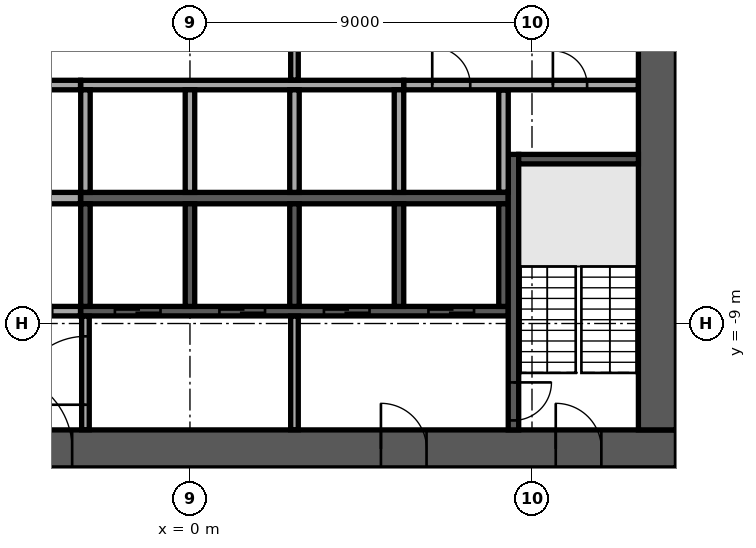
"""IFC4 building model, lengths in metres.
Left out: names, types, materials, properties, quantities, classifications, styles, units other than length and angle.
Written with IfcOpenShell. Run it as: python <this file> out.ifc"""

import sys

from ifc_helpers import new_model, si_unit, direction, frame, frame_2d, origin, place, context, subcontext, project, spatial, rectangle, extrude, element, fill, save


model = new_model("IFC4")
c1 = context("Model", 3, precision=1e-05, world=origin(), true_north=direction((0.0, 1.0)))
c2 = subcontext(c1, "Body", "Model", "MODEL_VIEW")
j1 = project(units=[si_unit("LENGTHUNIT", "METRE"), si_unit("PLANEANGLEUNIT", "RADIAN")], contexts=[c1])
p1 = place(None, origin())
s1 = spatial("IfcSite", under=j1, at=p1, CompositionType="ELEMENT")
p2 = place(p1, origin())
s2 = spatial("IfcBuilding", under=s1, at=p2, CompositionType="ELEMENT")
p3 = place(p2, frame((0.0, 0.0, 139.7)))
s3 = spatial("IfcBuildingStorey", under=s2, at=p3, CompositionType="ELEMENT", Elevation=139.7)
p4 = place(p3, frame((-12.8, -12.3, 0.0), z_axis=(0.0, 0.0, 1.0), x_axis=(1.0, 0.0, 0.0)))
e1 = element("IfcWall", 1, at=p4, inside=s3, PredefinedType="SHEAR", context=c2, shape_type="SweptSolid", body=[
    extrude(rectangle(XDim=25.6, YDim=1.0, at=frame_2d((12.8, 0.0))), origin(), (0.0, 0.0, 1.0), 3.6),
])
p5 = place(p4, frame((7.7, 0.0, 0.0)))
e2 = element("IfcOpeningElement", 2, at=p5, cuts=e1, PredefinedType="OPENING", context=c2, shape_type="SweptSolid", body=[
    extrude(rectangle(XDim=2.0, YDim=2.1, at=frame_2d((1.0, 1.05))), frame((0.0, 0.51, 0.0), z_axis=(0.0, -1.0, 0.0), x_axis=(1.0, 0.0, 0.0)), (0.0, 0.0, 1.0), 1.02),
])
p6 = place(p4, frame((17.825, 0.0, 0.0)))
e3 = element("IfcOpeningElement", 3, at=p6, cuts=e1, PredefinedType="OPENING", context=c2, shape_type="SweptSolid", body=[
    extrude(rectangle(XDim=1.2, YDim=2.1, at=frame_2d((0.6, 1.05))), frame((0.0, 0.51, 0.0), z_axis=(0.0, -1.0, 0.0), x_axis=(1.0, 0.0, 0.0)), (0.0, 0.0, 1.0), 1.02),
])
p7 = place(p4, frame((1.975, 0.0, 0.0)))
e4 = element("IfcOpeningElement", 4, at=p7, cuts=e1, PredefinedType="OPENING", context=c2, shape_type="SweptSolid", body=[
    extrude(rectangle(XDim=1.2, YDim=2.1, at=frame_2d((0.6, 1.05))), frame((0.0, 0.51, 0.0), z_axis=(0.0, -1.0, 0.0), x_axis=(1.0, 0.0, 0.0)), (0.0, 0.0, 1.0), 1.02),
])
p8 = place(p4, frame((22.425, 0.0, 0.0)))
e5 = element("IfcOpeningElement", 5, at=p8, cuts=e1, PredefinedType="OPENING", context=c2, shape_type="SweptSolid", body=[
    extrude(rectangle(XDim=1.2, YDim=2.1, at=frame_2d((0.6, 1.05))), frame((0.0, 0.51, 0.0), z_axis=(0.0, -1.0, 0.0), x_axis=(1.0, 0.0, 0.0)), (0.0, 0.0, 1.0), 1.02),
])
p9 = place(p3, frame((12.3, -11.8, 0.0), z_axis=(0.0, 0.0, 1.0), x_axis=(0.0, 1.0, 0.0)))
e6 = element("IfcWall", 6, at=p9, inside=s3, PredefinedType="SHEAR", context=c2, shape_type="SweptSolid", body=[
    extrude(rectangle(XDim=23.6, YDim=1.0, at=frame_2d((11.8, 0.0))), origin(), (0.0, 0.0, 1.0), 3.6),
])
p10 = place(p9, frame((10.6, 0.0, 0.0)))
e7 = element("IfcOpeningElement", 7, at=p10, cuts=e6, PredefinedType="OPENING", context=c2, shape_type="SweptSolid", body=[
    extrude(rectangle(XDim=2.4, YDim=2.4, at=frame_2d((1.2, 1.2))), frame((0.0, 0.51, 0.0), z_axis=(0.0, -1.0, 0.0), x_axis=(1.0, 0.0, 0.0)), (0.0, 0.0, 1.0), 1.02),
])
p11 = place(p3, frame((-2.875, -5.7, 0.0), z_axis=(0.0, 0.0, 1.0), x_axis=(1.0, 0.0, 0.0)))
e8 = element("IfcWall", 8, at=p11, inside=s3, PredefinedType="SOLIDWALL", context=c2, shape_type="SweptSolid", body=[
    extrude(rectangle(XDim=11.25, YDim=0.3, at=frame_2d((5.625, 0.0))), origin(), (0.0, 0.0, 1.0), 3.6),
])
p12 = place(p3, frame((-2.875, -2.725, 0.0), z_axis=(0.0, 0.0, 1.0), x_axis=(1.0, 0.0, 0.0)))
e9 = element("IfcWall", 9, at=p12, inside=s3, PredefinedType="SOLIDWALL", context=c2, shape_type="SweptSolid", body=[
    extrude(rectangle(XDim=8.5, YDim=0.25, at=frame_2d((4.25, 0.0))), origin(), (0.0, 0.0, 1.0), 3.6),
])
for number, where, z_axis, x_axis in (
    (10, (-2.75, -5.55, 0.0), (0.0, 0.0, 1.0), (0.0, 1.0, 0.0)),
    (11, (0.0, -5.55, 0.0), (0.0, 0.0, 1.0), (0.0, 1.0, 0.0)),
    (12, (2.75, -5.55, 0.0), (0.0, 0.0, 1.0), (0.0, 1.0, 0.0)),
    (13, (5.5, -5.55, 0.0), (0.0, 0.0, 1.0), (0.0, 1.0, 0.0)),
):
    element("IfcWall", number, at=place(p3, frame(where, z_axis=z_axis, x_axis=x_axis)), inside=s3, PredefinedType="SOLIDWALL", context=c2, shape_type="SweptSolid", body=[
        extrude(rectangle(XDim=2.7, YDim=0.25, at=frame_2d((1.35, 0.0))), origin(), (0.0, 0.0, 1.0), 3.6),
    ])
p13 = place(p3, frame((-2.875, -8.675, 0.0), z_axis=(0.0, 0.0, 1.0), x_axis=(1.0, 0.0, 0.0)))
e14 = element("IfcWall", 14, at=p13, inside=s3, PredefinedType="SOLIDWALL", context=c2, shape_type="SweptSolid", body=[
    extrude(rectangle(XDim=11.25, YDim=0.25, at=frame_2d((5.625, 0.0))), origin(), (0.0, 0.0, 1.0), 3.6),
])
p14 = place(p13, frame((0.9, 0.0, 0.0)))
e15 = element("IfcOpeningElement", 15, at=p14, cuts=e14, PredefinedType="OPENING", context=c2, shape_type="SweptSolid", body=[
    extrude(rectangle(XDim=1.2, YDim=2.1, at=frame_2d((0.6, 1.05))), frame((0.0, 0.135, 0.0), z_axis=(0.0, -1.0, 0.0), x_axis=(1.0, 0.0, 0.0)), (0.0, 0.0, 1.0), 0.27),
])
p15 = place(p13, frame((3.65, 0.0, 0.0)))
e16 = element("IfcOpeningElement", 16, at=p15, cuts=e14, PredefinedType="OPENING", context=c2, shape_type="SweptSolid", body=[
    extrude(rectangle(XDim=1.2, YDim=2.1, at=frame_2d((0.6, 1.05))), frame((0.0, 0.135, 0.0), z_axis=(0.0, -1.0, 0.0), x_axis=(1.0, 0.0, 0.0)), (0.0, 0.0, 1.0), 0.27),
])
p16 = place(p13, frame((6.4, 0.0, 0.0)))
e17 = element("IfcOpeningElement", 17, at=p16, cuts=e14, PredefinedType="OPENING", context=c2, shape_type="SweptSolid", body=[
    extrude(rectangle(XDim=1.2, YDim=2.1, at=frame_2d((0.6, 1.05))), frame((0.0, 0.135, 0.0), z_axis=(0.0, -1.0, 0.0), x_axis=(1.0, 0.0, 0.0)), (0.0, 0.0, 1.0), 0.27),
])
p17 = place(p13, frame((9.15, 0.0, 0.0)))
e18 = element("IfcOpeningElement", 18, at=p17, cuts=e14, PredefinedType="OPENING", context=c2, shape_type="SweptSolid", body=[
    extrude(rectangle(XDim=1.2, YDim=2.1, at=frame_2d((0.6, 1.05))), frame((0.0, 0.135, 0.0), z_axis=(0.0, -1.0, 0.0), x_axis=(1.0, 0.0, 0.0)), (0.0, 0.0, 1.0), 0.27),
])
for number, where, z_axis, x_axis in (
    (19, (-2.75, -8.55, 0.0), (0.0, 0.0, 1.0), (0.0, 1.0, 0.0)),
    (20, (0.0, -8.55, 0.0), (0.0, 0.0, 1.0), (0.0, 1.0, 0.0)),
    (21, (2.75, -8.55, 0.0), (0.0, 0.0, 1.0), (0.0, 1.0, 0.0)),
    (22, (5.5, -8.55, 0.0), (0.0, 0.0, 1.0), (0.0, 1.0, 0.0)),
    (23, (8.25, -8.55, 0.0), (0.0, 0.0, 1.0), (0.0, 1.0, 0.0)),
):
    element("IfcWall", number, at=place(p3, frame(where, z_axis=z_axis, x_axis=x_axis)), inside=s3, PredefinedType="SOLIDWALL", context=c2, shape_type="SweptSolid", body=[
        extrude(rectangle(XDim=2.7, YDim=0.25, at=frame_2d((1.35, 0.0))), origin(), (0.0, 0.0, 1.0), 3.6),
    ])
p18 = place(p3, frame((8.512, -4.55, 0.0), z_axis=(0.0, 0.0, 1.0), x_axis=(0.0, -1.0, 0.0)))
e24 = element("IfcWall", 24, at=p18, inside=s3, PredefinedType="SOLIDWALL", context=c2, shape_type="SweptSolid", body=[
    extrude(rectangle(XDim=7.25, YDim=0.275, at=frame_2d((3.625, 0.0))), origin(), (0.0, 0.0, 1.0), 3.6),
])
p19 = place(p18, frame((6.0, 0.0, 0.0)))
e25 = element("IfcOpeningElement", 25, at=p19, cuts=e24, PredefinedType="OPENING", context=c2, shape_type="SweptSolid", body=[
    extrude(rectangle(XDim=1.0, YDim=2.1, at=frame_2d((0.5, 1.05))), frame((0.0, 0.147, 0.0), z_axis=(0.0, -1.0, 0.0), x_axis=(1.0, 0.0, 0.0)), (0.0, 0.0, 1.0), 0.295),
])
p20 = place(p3, frame((8.65, -4.675, 0.0), z_axis=(0.0, 0.0, 1.0), x_axis=(1.0, 0.0, 0.0)))
e26 = element("IfcWall", 26, at=p20, inside=s3, PredefinedType="SOLIDWALL", context=c2, shape_type="SweptSolid", body=[
    extrude(rectangle(XDim=3.15, YDim=0.25, at=frame_2d((1.575, 0.0))), origin(), (0.0, 0.0, 1.0), 3.6),
])
p21 = place(p3, frame((-2.75, -11.795, 0.0), z_axis=(0.0, 0.0, 1.0), x_axis=(0.0, 1.0, 0.0)))
e27 = element("IfcWall", 27, at=p21, inside=s3, PredefinedType="PARTITIONING", context=c2, shape_type="SweptSolid", body=[
    extrude(rectangle(XDim=2.99, YDim=0.2, at=frame_2d((1.495, 0.0))), origin(), (0.0, 0.0, 1.0), 3.6),
])
p22 = place(p21, frame((0.657, 0.0, 0.0)))
e28 = element("IfcOpeningElement", 28, at=p22, cuts=e27, PredefinedType="OPENING", context=c2, shape_type="SweptSolid", body=[
    extrude(rectangle(XDim=1.8, YDim=2.1, at=frame_2d((0.9, 1.05))), frame((0.0, 0.11, 0.0), z_axis=(0.0, -1.0, 0.0), x_axis=(1.0, 0.0, 0.0)), (0.0, 0.0, 1.0), 0.22),
])
p23 = place(p3, frame((2.75, -11.795, 0.0), z_axis=(0.0, 0.0, 1.0), x_axis=(0.0, 1.0, 0.0)))
e29 = element("IfcWall", 29, at=p23, inside=s3, PredefinedType="PARTITIONING", context=c2, shape_type="SweptSolid", body=[
    extrude(rectangle(XDim=2.99, YDim=0.2, at=frame_2d((1.495, 0.0))), origin(), (0.0, 0.0, 1.0), 3.6),
])
p24 = place(p3, frame((-8.37, -8.675, 0.0), z_axis=(0.0, 0.0, 1.0), x_axis=(1.0, 0.0, 0.0)))
e30 = element("IfcWall", 30, at=p24, inside=s3, PredefinedType="PARTITIONING", context=c2, shape_type="SweptSolid", body=[
    extrude(rectangle(XDim=5.49, YDim=0.25, at=frame_2d((2.745, 0.0))), origin(), (0.0, 0.0, 1.0), 3.6),
])
p25 = place(p24, frame((0.995, 0.0, 0.0)))
e31 = element("IfcOpeningElement", 31, at=p25, cuts=e30, PredefinedType="OPENING", context=c2, shape_type="SweptSolid", body=[
    extrude(rectangle(XDim=1.0, YDim=2.1, at=frame_2d((0.5, 1.05))), frame((0.0, 0.135, 0.0), z_axis=(0.0, -1.0, 0.0), x_axis=(1.0, 0.0, 0.0)), (0.0, 0.0, 1.0), 0.27),
])
p26 = place(p24, frame((3.745, 0.0, 0.0)))
e32 = element("IfcOpeningElement", 32, at=p26, cuts=e30, PredefinedType="OPENING", context=c2, shape_type="SweptSolid", body=[
    extrude(rectangle(XDim=1.0, YDim=2.1, at=frame_2d((0.5, 1.05))), frame((0.0, 0.135, 0.0), z_axis=(0.0, -1.0, 0.0), x_axis=(1.0, 0.0, 0.0)), (0.0, 0.0, 1.0), 0.27),
])
p27 = place(p3, frame((-8.35, -5.7, 0.0), z_axis=(0.0, 0.0, 1.0), x_axis=(1.0, 0.0, 0.0)))
e33 = element("IfcWall", 33, at=p27, inside=s3, PredefinedType="PARTITIONING", context=c2, shape_type="SweptSolid", body=[
    extrude(rectangle(XDim=5.47, YDim=0.3, at=frame_2d((2.735, 0.0))), origin(), (0.0, 0.0, 1.0), 3.6),
])
p28 = place(p3, frame((8.25, -5.545, 0.0), z_axis=(0.0, 0.0, 1.0), x_axis=(0.0, 1.0, 0.0)))
e34 = element("IfcWall", 34, at=p28, inside=s3, PredefinedType="PARTITIONING", context=c2, shape_type="SweptSolid", body=[
    extrude(rectangle(XDim=2.69, YDim=0.25, at=frame_2d((1.345, 0.0))), origin(), (0.0, 0.0, 1.0), 3.6),
])
p29 = place(p3, frame((-11.795, -2.725, 0.0), z_axis=(0.0, 0.0, 1.0), x_axis=(1.0, 0.0, 0.0)))
e35 = element("IfcWall", 35, at=p29, inside=s3, PredefinedType="PARTITIONING", context=c2, shape_type="SweptSolid", body=[
    extrude(rectangle(XDim=8.915, YDim=0.25, at=frame_2d((4.458, 0.0))), origin(), (0.0, 0.0, 1.0), 3.6),
])
p30 = place(p29, frame((1.295, 0.0, 0.0)))
e36 = element("IfcOpeningElement", 36, at=p30, cuts=e35, PredefinedType="OPENING", context=c2, shape_type="SweptSolid", body=[
    extrude(rectangle(XDim=1.0, YDim=2.1, at=frame_2d((0.5, 1.05))), frame((0.0, 0.135, 0.0), z_axis=(0.0, -1.0, 0.0), x_axis=(1.0, 0.0, 0.0)), (0.0, 0.0, 1.0), 0.27),
])
p31 = place(p29, frame((4.42, 0.0, 0.0)))
e37 = element("IfcOpeningElement", 37, at=p31, cuts=e35, PredefinedType="OPENING", context=c2, shape_type="SweptSolid", body=[
    extrude(rectangle(XDim=1.0, YDim=2.1, at=frame_2d((0.5, 1.05))), frame((0.0, 0.135, 0.0), z_axis=(0.0, -1.0, 0.0), x_axis=(1.0, 0.0, 0.0)), (0.0, 0.0, 1.0), 0.27),
])
p32 = place(p3, frame((5.63, -2.725, 0.0), z_axis=(0.0, 0.0, 1.0), x_axis=(1.0, 0.0, 0.0)))
e38 = element("IfcWall", 38, at=p32, inside=s3, PredefinedType="PARTITIONING", context=c2, shape_type="SweptSolid", body=[
    extrude(rectangle(XDim=6.165, YDim=0.25, at=frame_2d((3.083, 0.0))), origin(), (0.0, 0.0, 1.0), 3.6),
])
p33 = place(p32, frame((0.745, 0.0, 0.0)))
e39 = element("IfcOpeningElement", 39, at=p33, cuts=e38, PredefinedType="OPENING", context=c2, shape_type="SweptSolid", body=[
    extrude(rectangle(XDim=1.0, YDim=2.1, at=frame_2d((0.5, 1.05))), frame((0.0, 0.135, 0.0), z_axis=(0.0, -1.0, 0.0), x_axis=(1.0, 0.0, 0.0)), (0.0, 0.0, 1.0), 0.27),
])
p34 = place(p32, frame((3.92, 0.0, 0.0)))
e40 = element("IfcOpeningElement", 40, at=p34, cuts=e38, PredefinedType="OPENING", context=c2, shape_type="SweptSolid", body=[
    extrude(rectangle(XDim=0.9, YDim=2.1, at=frame_2d((0.45, 1.05))), frame((0.0, 0.135, 0.0), z_axis=(0.0, -1.0, 0.0), x_axis=(1.0, 0.0, 0.0)), (0.0, 0.0, 1.0), 0.27),
])
p35 = place(p3, frame((2.75, -2.595, 0.0), z_axis=(0.0, 0.0, 1.0), x_axis=(0.0, 1.0, 0.0)))
e41 = element("IfcWall", 41, at=p35, inside=s3, PredefinedType="PARTITIONING", context=c2, shape_type="SweptSolid", body=[
    extrude(rectangle(XDim=5.19, YDim=0.2, at=frame_2d((2.595, 0.0))), origin(), (0.0, 0.0, 1.0), 3.6),
])
p36 = place(p35, frame((1.395, 0.0, 0.0)))
e42 = element("IfcOpeningElement", 42, at=p36, cuts=e41, PredefinedType="OPENING", context=c2, shape_type="SweptSolid", body=[
    extrude(rectangle(XDim=2.4, YDim=2.4, at=frame_2d((1.2, 1.2))), frame((0.0, 0.11, 0.0), z_axis=(0.0, -1.0, 0.0), x_axis=(1.0, 0.0, 0.0)), (0.0, 0.0, 1.0), 0.22),
])
p37 = place(p3, frame((-9.103, -34.888, 0.0), z_axis=(0.0, 0.0, 1.0), x_axis=(0.874618897425, 0.484811081007, 0.0)))
e43 = element("IfcWall", 43, at=p37, inside=s3, PredefinedType="STANDARD", context=c2, shape_type="SweptSolid", body=[
    extrude(rectangle(XDim=49.751, YDim=0.6, at=frame_2d((24.876, 0.0))), origin(), (0.0, 0.0, 1.0), 3.6),
])
p38 = place(p37, frame((1.161, 0.0, 0.9)))
e44 = element("IfcOpeningElement", 44, at=p38, cuts=e43, PredefinedType="OPENING", context=c2, shape_type="SweptSolid", body=[
    extrude(rectangle(XDim=2.1, YDim=2.1, at=frame_2d((1.05, 1.05))), frame((0.0, 0.31, 0.0), z_axis=(0.0, -1.0, 0.0), x_axis=(1.0, 0.0, 0.0)), (0.0, 0.0, 1.0), 0.62),
])
p39 = place(p37, frame((5.644, 0.0, 0.9)))
e45 = element("IfcOpeningElement", 45, at=p39, cuts=e43, PredefinedType="OPENING", context=c2, shape_type="SweptSolid", body=[
    extrude(rectangle(XDim=2.1, YDim=2.1, at=frame_2d((1.05, 1.05))), frame((0.0, 0.31, 0.0), z_axis=(0.0, -1.0, 0.0), x_axis=(1.0, 0.0, 0.0)), (0.0, 0.0, 1.0), 0.62),
])
p40 = place(p37, frame((10.189, 0.0, 0.9)))
e46 = element("IfcOpeningElement", 46, at=p40, cuts=e43, PredefinedType="OPENING", context=c2, shape_type="SweptSolid", body=[
    extrude(rectangle(XDim=2.1, YDim=2.1, at=frame_2d((1.05, 1.05))), frame((0.0, 0.31, 0.0), z_axis=(0.0, -1.0, 0.0), x_axis=(1.0, 0.0, 0.0)), (0.0, 0.0, 1.0), 0.62),
])
p41 = place(p37, frame((14.735, 0.0, 0.9)))
e47 = element("IfcOpeningElement", 47, at=p41, cuts=e43, PredefinedType="OPENING", context=c2, shape_type="SweptSolid", body=[
    extrude(rectangle(XDim=2.1, YDim=2.1, at=frame_2d((1.05, 1.05))), frame((0.0, 0.31, 0.0), z_axis=(0.0, -1.0, 0.0), x_axis=(1.0, 0.0, 0.0)), (0.0, 0.0, 1.0), 0.62),
])
p42 = place(p37, frame((19.28, 0.0, 0.9)))
e48 = element("IfcOpeningElement", 48, at=p42, cuts=e43, PredefinedType="OPENING", context=c2, shape_type="SweptSolid", body=[
    extrude(rectangle(XDim=2.1, YDim=2.1, at=frame_2d((1.05, 1.05))), frame((0.0, 0.31, 0.0), z_axis=(0.0, -1.0, 0.0), x_axis=(1.0, 0.0, 0.0)), (0.0, 0.0, 1.0), 0.62),
])
p43 = place(p37, frame((23.826, 0.0, 0.9)))
e49 = element("IfcOpeningElement", 49, at=p43, cuts=e43, PredefinedType="OPENING", context=c2, shape_type="SweptSolid", body=[
    extrude(rectangle(XDim=2.1, YDim=2.1, at=frame_2d((1.05, 1.05))), frame((0.0, 0.31, 0.0), z_axis=(0.0, -1.0, 0.0), x_axis=(1.0, 0.0, 0.0)), (0.0, 0.0, 1.0), 0.62),
])
p44 = place(p37, frame((28.371, 0.0, 0.9)))
e50 = element("IfcOpeningElement", 50, at=p44, cuts=e43, PredefinedType="OPENING", context=c2, shape_type="SweptSolid", body=[
    extrude(rectangle(XDim=2.1, YDim=2.1, at=frame_2d((1.05, 1.05))), frame((0.0, 0.31, 0.0), z_axis=(0.0, -1.0, 0.0), x_axis=(1.0, 0.0, 0.0)), (0.0, 0.0, 1.0), 0.62),
])
p45 = place(p37, frame((32.917, 0.0, 0.9)))
e51 = element("IfcOpeningElement", 51, at=p45, cuts=e43, PredefinedType="OPENING", context=c2, shape_type="SweptSolid", body=[
    extrude(rectangle(XDim=2.1, YDim=2.1, at=frame_2d((1.05, 1.05))), frame((0.0, 0.31, 0.0), z_axis=(0.0, -1.0, 0.0), x_axis=(1.0, 0.0, 0.0)), (0.0, 0.0, 1.0), 0.62),
])
p46 = place(p37, frame((37.462, 0.0, 0.9)))
e52 = element("IfcOpeningElement", 52, at=p46, cuts=e43, PredefinedType="OPENING", context=c2, shape_type="SweptSolid", body=[
    extrude(rectangle(XDim=2.1, YDim=2.1, at=frame_2d((1.05, 1.05))), frame((0.0, 0.31, 0.0), z_axis=(0.0, -1.0, 0.0), x_axis=(1.0, 0.0, 0.0)), (0.0, 0.0, 1.0), 0.62),
])
p47 = place(p37, frame((42.008, 0.0, 0.9)))
e53 = element("IfcOpeningElement", 53, at=p47, cuts=e43, PredefinedType="OPENING", context=c2, shape_type="SweptSolid", body=[
    extrude(rectangle(XDim=2.1, YDim=2.1, at=frame_2d((1.05, 1.05))), frame((0.0, 0.31, 0.0), z_axis=(0.0, -1.0, 0.0), x_axis=(1.0, 0.0, 0.0)), (0.0, 0.0, 1.0), 0.62),
])
p48 = place(p37, frame((46.491, 0.0, 0.9)))
e54 = element("IfcOpeningElement", 54, at=p48, cuts=e43, PredefinedType="OPENING", context=c2, shape_type="SweptSolid", body=[
    extrude(rectangle(XDim=2.1, YDim=2.1, at=frame_2d((1.05, 1.05))), frame((0.0, 0.31, 0.0), z_axis=(0.0, -1.0, 0.0), x_axis=(1.0, 0.0, 0.0)), (0.0, 0.0, 1.0), 0.62),
])
p49 = place(p3, frame((-4.484, -24.462, 0.0), z_axis=(0.0, 0.0, 1.0), x_axis=(0.874618059696, 0.484812592301, 0.0)))
e55 = element("IfcWall", 55, at=p49, inside=s3, PredefinedType="PARTITIONING", context=c2, shape_type="SweptSolid", body=[
    extrude(rectangle(XDim=31.638, YDim=0.15, at=frame_2d((15.819, 0.0))), origin(), (0.0, 0.0, 1.0), 3.15),
])
p50 = place(p49, frame((9.25, 0.0, 0.0)))
e56 = element("IfcOpeningElement", 56, at=p50, cuts=e55, PredefinedType="OPENING", context=c2, shape_type="SweptSolid", body=[
    extrude(rectangle(XDim=1.0, YDim=2.1, at=frame_2d((0.5, 1.05))), frame((0.0, 0.085, 0.0), z_axis=(0.0, -1.0, 0.0), x_axis=(1.0, 0.0, 0.0)), (0.0, 0.0, 1.0), 0.17),
])
p51 = place(p49, frame((19.239, 0.0, 0.0)))
e57 = element("IfcOpeningElement", 57, at=p51, cuts=e55, PredefinedType="OPENING", context=c2, shape_type="SweptSolid", body=[
    extrude(rectangle(XDim=1.0, YDim=2.1, at=frame_2d((0.5, 1.05))), frame((0.0, 0.085, 0.0), z_axis=(0.0, -1.0, 0.0), x_axis=(1.0, 0.0, 0.0)), (0.0, 0.0, 1.0), 0.17),
])
p52 = place(p49, frame((24.772, 0.0, 0.0)))
e58 = element("IfcOpeningElement", 58, at=p52, cuts=e55, PredefinedType="OPENING", context=c2, shape_type="SweptSolid", body=[
    extrude(rectangle(XDim=1.0, YDim=2.1, at=frame_2d((0.5, 1.05))), frame((0.0, 0.085, 0.0), z_axis=(0.0, -1.0, 0.0), x_axis=(1.0, 0.0, 0.0)), (0.0, 0.0, 1.0), 0.17),
])
p53 = place(p5, origin())
e59 = element("IfcDoor", 59, at=p53, inside=s3, OperationType="SINGLE_SWING_LEFT", PredefinedType="DOOR", context=c2, shape_type="SweptSolid", body=[
    extrude(rectangle(XDim=2.0, YDim=2.1, at=frame_2d((1.0, 1.05))), frame((0.0, 0.025, 0.0), z_axis=(0.0, -1.0, 0.0), x_axis=(1.0, 0.0, 0.0)), (0.0, 0.0, 1.0), 0.05),
])
fill(e2, e59)
p54 = place(p6, origin())
e60 = element("IfcDoor", 60, at=p54, inside=s3, OperationType="SINGLE_SWING_LEFT", PredefinedType="DOOR", context=c2, shape_type="SweptSolid", body=[
    extrude(rectangle(XDim=1.2, YDim=2.1, at=frame_2d((0.6, 1.05))), frame((0.0, 0.025, 0.0), z_axis=(0.0, -1.0, 0.0), x_axis=(1.0, 0.0, 0.0)), (0.0, 0.0, 1.0), 0.05),
])
fill(e3, e60)
p55 = place(p8, origin())
e61 = element("IfcDoor", 61, at=p55, inside=s3, OperationType="SINGLE_SWING_LEFT", PredefinedType="DOOR", context=c2, shape_type="SweptSolid", body=[
    extrude(rectangle(XDim=1.2, YDim=2.1, at=frame_2d((0.6, 1.05))), frame((0.0, 0.025, 0.0), z_axis=(0.0, -1.0, 0.0), x_axis=(1.0, 0.0, 0.0)), (0.0, 0.0, 1.0), 0.05),
])
fill(e5, e61)
p56 = place(p14, origin())
e62 = element("IfcDoor", 62, at=p56, inside=s3, OperationType="DOUBLE_DOOR_SLIDING", PredefinedType="DOOR", context=c2, shape_type="SweptSolid", body=[
    extrude(rectangle(XDim=1.2, YDim=2.1, at=frame_2d((0.6, 1.05))), frame((0.0, 0.025, 0.0), z_axis=(0.0, -1.0, 0.0), x_axis=(1.0, 0.0, 0.0)), (0.0, 0.0, 1.0), 0.05),
])
fill(e15, e62)
p57 = place(p15, origin())
e63 = element("IfcDoor", 63, at=p57, inside=s3, OperationType="DOUBLE_DOOR_SLIDING", PredefinedType="DOOR", context=c2, shape_type="SweptSolid", body=[
    extrude(rectangle(XDim=1.2, YDim=2.1, at=frame_2d((0.6, 1.05))), frame((0.0, 0.025, 0.0), z_axis=(0.0, -1.0, 0.0), x_axis=(1.0, 0.0, 0.0)), (0.0, 0.0, 1.0), 0.05),
])
fill(e16, e63)
p58 = place(p16, origin())
e64 = element("IfcDoor", 64, at=p58, inside=s3, OperationType="DOUBLE_DOOR_SLIDING", PredefinedType="DOOR", context=c2, shape_type="SweptSolid", body=[
    extrude(rectangle(XDim=1.2, YDim=2.1, at=frame_2d((0.6, 1.05))), frame((0.0, 0.025, 0.0), z_axis=(0.0, -1.0, 0.0), x_axis=(1.0, 0.0, 0.0)), (0.0, 0.0, 1.0), 0.05),
])
fill(e17, e64)
p59 = place(p17, origin())
e65 = element("IfcDoor", 65, at=p59, inside=s3, OperationType="DOUBLE_DOOR_SLIDING", PredefinedType="DOOR", context=c2, shape_type="SweptSolid", body=[
    extrude(rectangle(XDim=1.2, YDim=2.1, at=frame_2d((0.6, 1.05))), frame((0.0, 0.025, 0.0), z_axis=(0.0, -1.0, 0.0), x_axis=(1.0, 0.0, 0.0)), (0.0, 0.0, 1.0), 0.05),
])
fill(e18, e65)
p60 = place(p19, origin())
e66 = element("IfcDoor", 66, at=p60, inside=s3, OperationType="SINGLE_SWING_LEFT", PredefinedType="DOOR", context=c2, shape_type="SweptSolid", body=[
    extrude(rectangle(XDim=1.0, YDim=2.1, at=frame_2d((0.5, 1.05))), frame((0.0, 0.025, 0.0), z_axis=(0.0, -1.0, 0.0), x_axis=(1.0, 0.0, 0.0)), (0.0, 0.0, 1.0), 0.05),
])
fill(e25, e66)
p61 = place(p33, origin())
e67 = element("IfcDoor", 67, at=p61, inside=s3, OperationType="SINGLE_SWING_LEFT", PredefinedType="DOOR", context=c2, shape_type="SweptSolid", body=[
    extrude(rectangle(XDim=1.0, YDim=2.1, at=frame_2d((0.5, 1.05))), frame((0.0, 0.025, 0.0), z_axis=(0.0, -1.0, 0.0), x_axis=(1.0, 0.0, 0.0)), (0.0, 0.0, 1.0), 0.05),
])
fill(e39, e67)
p62 = place(p34, origin())
e68 = element("IfcDoor", 68, at=p62, inside=s3, OperationType="SINGLE_SWING_LEFT", PredefinedType="DOOR", context=c2, shape_type="SweptSolid", body=[
    extrude(rectangle(XDim=0.9, YDim=2.1, at=frame_2d((0.45, 1.05))), frame((0.0, 0.025, 0.0), z_axis=(0.0, -1.0, 0.0), x_axis=(1.0, 0.0, 0.0)), (0.0, 0.0, 1.0), 0.05),
])
fill(e40, e68)
p63 = place(p22, origin())
e69 = element("IfcDoor", 69, at=p63, inside=s3, OperationType="SINGLE_SWING_LEFT", PredefinedType="DOOR", context=c2, shape_type="SweptSolid", body=[
    extrude(rectangle(XDim=1.8, YDim=2.1, at=frame_2d((0.9, 1.05))), frame((0.0, 0.025, 0.0), z_axis=(0.0, -1.0, 0.0), x_axis=(1.0, 0.0, 0.0)), (0.0, 0.0, 1.0), 0.05),
])
fill(e28, e69)
save(model, sys.argv[1])
